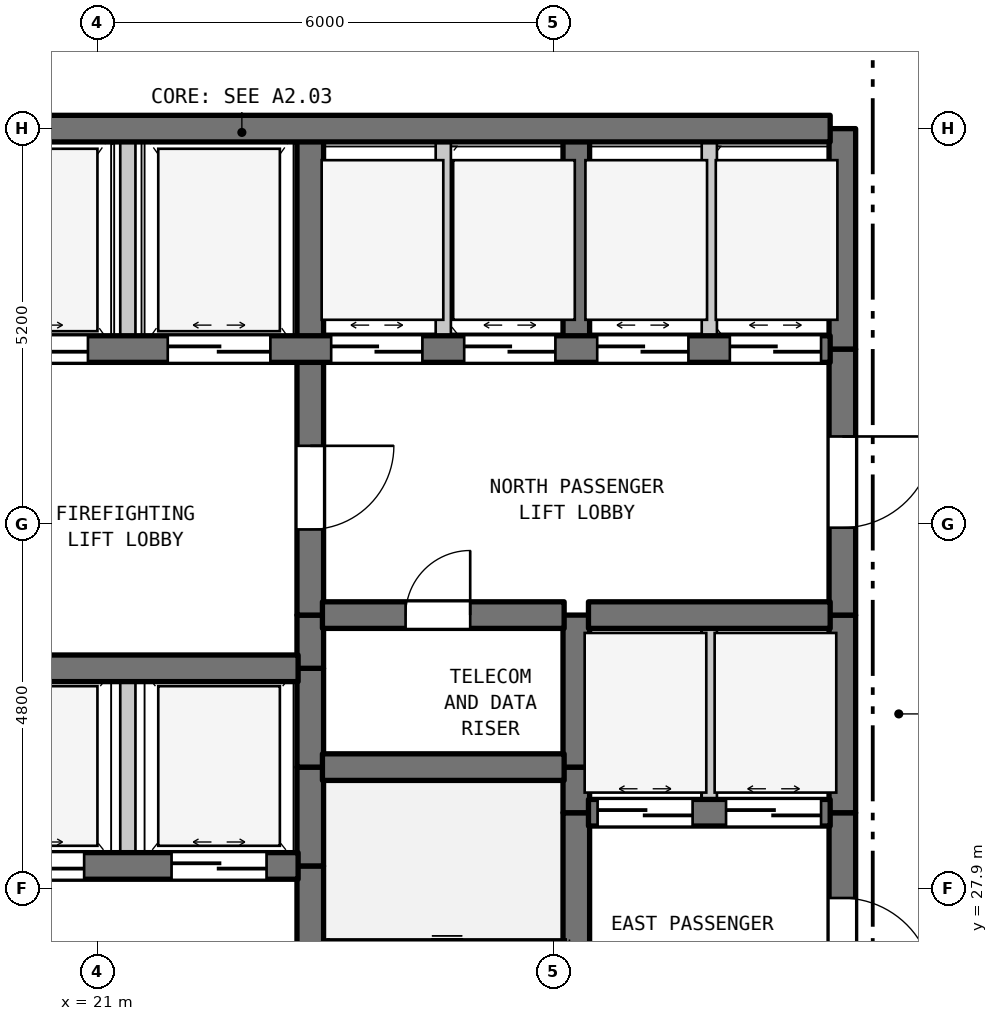
"""IFC4 building model, lengths in metres.
Left out: names, types, materials, properties, quantities, classifications, styles, units other than length and angle.
Written with IfcOpenShell. Run it as: python <this file> out.ifc"""

import sys

from ifc_helpers import new_model, si_unit, direction, frame, frame_2d, origin, place, context, subcontext, project, spatial, rectangle, extrude, element, fill, save


model = new_model("IFC4")
c1 = context("Model", 3, precision=1e-05, world=origin(), true_north=direction((0.0, 1.0)))
c2 = subcontext(c1, "Body", "Model", "MODEL_VIEW")
j1 = project(units=[si_unit("LENGTHUNIT", "METRE"), si_unit("PLANEANGLEUNIT", "RADIAN")], contexts=[c1])
p1 = place(None, origin())
s1 = spatial("IfcSite", under=j1, at=p1, CompositionType="ELEMENT")
p2 = place(p1, origin())
s2 = spatial("IfcBuilding", under=s1, at=p2, CompositionType="ELEMENT")
p3 = place(p2, origin())
s3 = spatial("IfcBuildingStorey", under=s2, at=p3, CompositionType="ELEMENT", Elevation=0.0)
p4 = place(p3, frame((21.4, 28.2, 0.0), z_axis=(0.0, 0.0, 1.0), x_axis=(0.0, 1.0, 0.0)))
e1 = element("IfcWall", 1, at=p4, inside=s3, PredefinedType="STANDARD", context=c2, shape_type="SweptSolid", body=[
    extrude(rectangle(XDim=2.6, YDim=0.2, at=frame_2d((1.3, 0.0))), origin(), (0.0, 0.0, 1.0), 6.17),
])
p5 = place(p3, frame((21.4, 35.0, 0.0), z_axis=(0.0, 0.0, 1.0), x_axis=(0.0, 1.0, 0.0)))
e2 = element("IfcWall", 2, at=p5, inside=s3, PredefinedType="STANDARD", context=c2, shape_type="SweptSolid", body=[
    extrude(rectangle(XDim=2.9, YDim=0.2, at=frame_2d((1.45, 0.0))), origin(), (0.0, 0.0, 1.0), 6.17),
])
p6 = place(p3, frame((23.8, 22.7, 0.0), z_axis=(0.0, 0.0, 1.0), x_axis=(0.0, 1.0, 0.0)))
e3 = element("IfcWall", 3, at=p6, inside=s3, PredefinedType="SHEAR", context=c2, shape_type="SweptSolid", body=[
    extrude(rectangle(XDim=5.5, YDim=0.35, at=frame_2d((2.75, 0.0))), origin(), (0.0, 0.0, 1.0), 6.17),
])
p7 = place(p6, frame((0.235, 0.0, 0.0)))
e4 = element("IfcOpeningElement", 4, at=p7, cuts=e3, PredefinedType="OPENING", context=c2, shape_type="SweptSolid", body=[
    extrude(rectangle(XDim=1.1, YDim=2.15, at=frame_2d((0.55, 1.075))), frame((0.0, 0.185, 0.0), z_axis=(0.0, -1.0, 0.0), x_axis=(1.0, 0.0, 0.0)), (0.0, 0.0, 1.0), 0.37),
])
for number, where, z_axis, x_axis in (
    (5, (23.8, 28.2, 0.0), (0.0, 0.0, 1.0), (0.0, 1.0, 0.0)),
    (6, (23.8, 29.5, 0.0), (0.0, 0.0, 1.0), (0.0, 1.0, 0.0)),
):
    element("IfcWall", number, at=place(p3, frame(where, z_axis=z_axis, x_axis=x_axis)), inside=s3, PredefinedType="SHEAR", context=c2, shape_type="SweptSolid", body=[
        extrude(rectangle(XDim=1.3, YDim=0.35, at=frame_2d((0.65, 0.0))), origin(), (0.0, 0.0, 1.0), 6.17),
    ])
p8 = place(p3, frame((23.8, 30.8, 0.0), z_axis=(0.0, 0.0, 1.0), x_axis=(0.0, 1.0, 0.0)))
e7 = element("IfcWall", 7, at=p8, inside=s3, PredefinedType="SHEAR", context=c2, shape_type="SweptSolid", body=[
    extrude(rectangle(XDim=0.7, YDim=0.35, at=frame_2d((0.35, 0.0))), origin(), (0.0, 0.0, 1.0), 6.17),
])
p9 = place(p3, frame((23.8, 31.5, 0.0), z_axis=(0.0, 0.0, 1.0), x_axis=(0.0, 1.0, 0.0)))
e8 = element("IfcWall", 8, at=p9, inside=s3, PredefinedType="SHEAR", context=c2, shape_type="SweptSolid", body=[
    extrude(rectangle(XDim=3.5, YDim=0.35, at=frame_2d((1.75, 0.0))), origin(), (0.0, 0.0, 1.0), 6.17),
])
p10 = place(p9, frame((1.127, 0.0, 0.0)))
e9 = element("IfcOpeningElement", 9, at=p10, cuts=e8, PredefinedType="OPENING", context=c2, shape_type="SweptSolid", body=[
    extrude(rectangle(XDim=1.1, YDim=2.15, at=frame_2d((0.55, 1.075))), frame((0.0, 0.185, 0.0), z_axis=(0.0, -1.0, 0.0), x_axis=(1.0, 0.0, 0.0)), (0.0, 0.0, 1.0), 0.37),
])
p11 = place(p3, frame((23.8, 35.0, 0.0), z_axis=(0.0, 0.0, 1.0), x_axis=(0.0, 1.0, 0.0)))
e10 = element("IfcWall", 10, at=p11, inside=s3, PredefinedType="SHEAR", context=c2, shape_type="SweptSolid", body=[
    extrude(rectangle(XDim=2.9, YDim=0.35, at=frame_2d((1.45, 0.0))), origin(), (0.0, 0.0, 1.0), 6.17),
])
p12 = place(p3, frame((25.55, 35.0, 0.0), z_axis=(0.0, 0.0, 1.0), x_axis=(0.0, 1.0, 0.0)))
e11 = element("IfcWall", 11, at=p12, inside=s3, PredefinedType="STANDARD", context=c2, shape_type="SweptSolid", body=[
    extrude(rectangle(XDim=2.9, YDim=0.2, at=frame_2d((1.45, 0.0))), origin(), (0.0, 0.0, 1.0), 6.17),
])
p13 = place(p3, frame((27.3, 25.6, 0.0), z_axis=(0.0, 0.0, 1.0), x_axis=(0.0, 1.0, 0.0)))
e12 = element("IfcWall", 12, at=p13, inside=s3, PredefinedType="SHEAR", context=c2, shape_type="SweptSolid", body=[
    extrude(rectangle(XDim=3.3, YDim=0.35, at=frame_2d((1.65, 0.0))), origin(), (0.0, 0.0, 1.0), 6.17),
])
p14 = place(p3, frame((27.3, 28.9, 0.0), z_axis=(0.0, 0.0, 1.0), x_axis=(0.0, 1.0, 0.0)))
e13 = element("IfcWall", 13, at=p14, inside=s3, PredefinedType="SHEAR", context=c2, shape_type="SweptSolid", body=[
    extrude(rectangle(XDim=0.6, YDim=0.35, at=frame_2d((0.3, 0.0))), origin(), (0.0, 0.0, 1.0), 6.17),
])
p15 = place(p3, frame((27.3, 29.5, 0.0), z_axis=(0.0, 0.0, 1.0), x_axis=(0.0, 1.0, 0.0)))
e14 = element("IfcWall", 14, at=p15, inside=s3, PredefinedType="SHEAR", context=c2, shape_type="SweptSolid", body=[
    extrude(rectangle(XDim=2.0, YDim=0.35, at=frame_2d((1.0, 0.0))), origin(), (0.0, 0.0, 1.0), 6.17),
])
p16 = place(p3, frame((27.3, 35.0, 0.0), z_axis=(0.0, 0.0, 1.0), x_axis=(0.0, 1.0, 0.0)))
e15 = element("IfcWall", 15, at=p16, inside=s3, PredefinedType="SHEAR", context=c2, shape_type="SweptSolid", body=[
    extrude(rectangle(XDim=2.9, YDim=0.35, at=frame_2d((1.45, 0.0))), origin(), (0.0, 0.0, 1.0), 6.17),
])
p17 = place(p3, frame((29.05, 28.9, 0.0), z_axis=(0.0, 0.0, 1.0), x_axis=(0.0, 1.0, 0.0)))
e16 = element("IfcWall", 16, at=p17, inside=s3, PredefinedType="STANDARD", context=c2, shape_type="SweptSolid", body=[
    extrude(rectangle(XDim=2.6, YDim=0.2, at=frame_2d((1.3, 0.0))), origin(), (0.0, 0.0, 1.0), 6.17),
])
p18 = place(p3, frame((29.05, 35.0, 0.0), z_axis=(0.0, 0.0, 1.0), x_axis=(0.0, 1.0, 0.0)))
e17 = element("IfcWall", 17, at=p18, inside=s3, PredefinedType="STANDARD", context=c2, shape_type="SweptSolid", body=[
    extrude(rectangle(XDim=2.9, YDim=0.2, at=frame_2d((1.45, 0.0))), origin(), (0.0, 0.0, 1.0), 6.17),
])
p19 = place(p3, frame((30.8, 25.6, 0.0), z_axis=(0.0, 0.0, 1.0), x_axis=(0.0, 1.0, 0.0)))
e18 = element("IfcWall", 18, at=p19, inside=s3, PredefinedType="SHEAR", context=c2, shape_type="SweptSolid", body=[
    extrude(rectangle(XDim=3.3, YDim=0.35, at=frame_2d((1.65, 0.0))), origin(), (0.0, 0.0, 1.0), 6.17),
])
p20 = place(p19, frame((0.978, 0.0, 0.0)))
e19 = element("IfcOpeningElement", 19, at=p20, cuts=e18, PredefinedType="OPENING", context=c2, shape_type="SweptSolid", body=[
    extrude(rectangle(XDim=1.2, YDim=2.2, at=frame_2d((0.6, 1.1))), frame((0.0, 0.185, 0.0), z_axis=(0.0, -1.0, 0.0), x_axis=(1.0, 0.0, 0.0)), (0.0, 0.0, 1.0), 0.37),
])
p21 = place(p3, frame((30.8, 28.9, 0.0), z_axis=(0.0, 0.0, 1.0), x_axis=(0.0, 1.0, 0.0)))
e20 = element("IfcWall", 20, at=p21, inside=s3, PredefinedType="SHEAR", context=c2, shape_type="SweptSolid", body=[
    extrude(rectangle(XDim=2.6, YDim=0.35, at=frame_2d((1.3, 0.0))), origin(), (0.0, 0.0, 1.0), 6.17),
])
p22 = place(p3, frame((30.8, 31.5, 0.0), z_axis=(0.0, 0.0, 1.0), x_axis=(0.0, 1.0, 0.0)))
e21 = element("IfcWall", 21, at=p22, inside=s3, PredefinedType="SHEAR", context=c2, shape_type="SweptSolid", body=[
    extrude(rectangle(XDim=3.5, YDim=0.35, at=frame_2d((1.75, 0.0))), origin(), (0.0, 0.0, 1.0), 6.17),
])
p23 = place(p22, frame((1.15, 0.0, 0.0)))
e22 = element("IfcOpeningElement", 22, at=p23, cuts=e21, PredefinedType="OPENING", context=c2, shape_type="SweptSolid", body=[
    extrude(rectangle(XDim=1.2, YDim=2.2, at=frame_2d((0.6, 1.1))), frame((0.0, 0.185, 0.0), z_axis=(0.0, -1.0, 0.0), x_axis=(1.0, 0.0, 0.0)), (0.0, 0.0, 1.0), 0.37),
])
p24 = place(p3, frame((30.8, 35.0, 0.0), z_axis=(0.0, 0.0, 1.0), x_axis=(0.0, 1.0, 0.0)))
e23 = element("IfcWall", 23, at=p24, inside=s3, PredefinedType="SHEAR", context=c2, shape_type="SweptSolid", body=[
    extrude(rectangle(XDim=2.9, YDim=0.35, at=frame_2d((1.45, 0.0))), origin(), (0.0, 0.0, 1.0), 6.17),
])
p25 = place(p3, frame((19.16, 28.2, 0.0), z_axis=(0.0, 0.0, 1.0), x_axis=(1.0, 0.0, 0.0)))
e24 = element("IfcWall", 24, at=p25, inside=s3, PredefinedType="SHEAR", context=c2, shape_type="SweptSolid", body=[
    extrude(rectangle(XDim=4.48, YDim=0.35, at=frame_2d((2.24, 0.0))), origin(), (0.0, 0.0, 1.0), 6.17),
])
p26 = place(p25, frame((0.415, 0.0, 0.0)))
e25 = element("IfcOpeningElement", 25, at=p26, cuts=e24, PredefinedType="OPENING", context=c2, shape_type="SweptSolid", body=[
    extrude(rectangle(XDim=1.25, YDim=2.2, at=frame_2d((0.625, 1.1))), frame((0.0, 0.185, 0.0), z_axis=(0.0, -1.0, 0.0), x_axis=(1.0, 0.0, 0.0)), (0.0, 0.0, 1.0), 0.37),
])
p27 = place(p25, frame((2.815, 0.0, 0.0)))
e26 = element("IfcOpeningElement", 26, at=p27, cuts=e24, PredefinedType="OPENING", context=c2, shape_type="SweptSolid", body=[
    extrude(rectangle(XDim=1.25, YDim=2.2, at=frame_2d((0.625, 1.1))), frame((0.0, 0.185, 0.0), z_axis=(0.0, -1.0, 0.0), x_axis=(1.0, 0.0, 0.0)), (0.0, 0.0, 1.0), 0.37),
])
p28 = place(p3, frame((27.46, 28.9, 0.0), z_axis=(0.0, 0.0, 1.0), x_axis=(1.0, 0.0, 0.0)))
e27 = element("IfcWall", 27, at=p28, inside=s3, PredefinedType="SHEAR", context=c2, shape_type="SweptSolid", body=[
    extrude(rectangle(XDim=3.18, YDim=0.35, at=frame_2d((1.59, 0.0))), origin(), (0.0, 0.0, 1.0), 6.17),
])
p29 = place(p28, frame((0.12, 0.0, 0.0)))
e28 = element("IfcOpeningElement", 28, at=p29, cuts=e27, PredefinedType="OPENING", context=c2, shape_type="SweptSolid", body=[
    extrude(rectangle(XDim=1.25, YDim=2.2, at=frame_2d((0.625, 1.1))), frame((0.0, 0.185, 0.0), z_axis=(0.0, -1.0, 0.0), x_axis=(1.0, 0.0, 0.0)), (0.0, 0.0, 1.0), 0.37),
])
p30 = place(p28, frame((1.81, 0.0, 0.0)))
e29 = element("IfcOpeningElement", 29, at=p30, cuts=e27, PredefinedType="OPENING", context=c2, shape_type="SweptSolid", body=[
    extrude(rectangle(XDim=1.25, YDim=2.2, at=frame_2d((0.625, 1.1))), frame((0.0, 0.185, 0.0), z_axis=(0.0, -1.0, 0.0), x_axis=(1.0, 0.0, 0.0)), (0.0, 0.0, 1.0), 0.37),
])
p31 = place(p3, frame((23.96, 29.5, 0.0), z_axis=(0.0, 0.0, 1.0), x_axis=(1.0, 0.0, 0.0)))
e30 = element("IfcWall", 30, at=p31, inside=s3, PredefinedType="SHEAR", context=c2, shape_type="SweptSolid", body=[
    extrude(rectangle(XDim=3.18, YDim=0.35, at=frame_2d((1.59, 0.0))), origin(), (0.0, 0.0, 1.0), 6.17),
])
p32 = place(p3, frame((19.16, 30.8, 0.0), z_axis=(0.0, 0.0, 1.0), x_axis=(1.0, 0.0, 0.0)))
e31 = element("IfcWall", 31, at=p32, inside=s3, PredefinedType="SHEAR", context=c2, shape_type="SweptSolid", body=[
    extrude(rectangle(XDim=4.48, YDim=0.35, at=frame_2d((2.24, 0.0))), origin(), (0.0, 0.0, 1.0), 6.17),
])
p33 = place(p3, frame((23.96, 31.5, 0.0), z_axis=(0.0, 0.0, 1.0), x_axis=(1.0, 0.0, 0.0)))
e32 = element("IfcWall", 32, at=p33, inside=s3, PredefinedType="SHEAR", context=c2, shape_type="SweptSolid", body=[
    extrude(rectangle(XDim=3.18, YDim=0.35, at=frame_2d((1.59, 0.0))), origin(), (0.0, 0.0, 1.0), 6.17),
])
p34 = place(p33, frame((1.094, 0.0, 0.0)))
e33 = element("IfcOpeningElement", 33, at=p34, cuts=e32, PredefinedType="OPENING", context=c2, shape_type="SweptSolid", body=[
    extrude(rectangle(XDim=0.85, YDim=2.1, at=frame_2d((0.425, 1.05))), frame((0.0, 0.185, 0.0), z_axis=(0.0, -1.0, 0.0), x_axis=(1.0, 0.0, 0.0)), (0.0, 0.0, 1.0), 0.37),
])
p35 = place(p3, frame((27.46, 31.5, 0.0), z_axis=(0.0, 0.0, 1.0), x_axis=(1.0, 0.0, 0.0)))
e34 = element("IfcWall", 34, at=p35, inside=s3, PredefinedType="SHEAR", context=c2, shape_type="SweptSolid", body=[
    extrude(rectangle(XDim=3.18, YDim=0.35, at=frame_2d((1.59, 0.0))), origin(), (0.0, 0.0, 1.0), 6.17),
])
p36 = place(p3, frame((19.16, 35.0, 0.0), z_axis=(0.0, 0.0, 1.0), x_axis=(1.0, 0.0, 0.0)))
e35 = element("IfcWall", 35, at=p36, inside=s3, PredefinedType="SHEAR", context=c2, shape_type="SweptSolid", body=[
    extrude(rectangle(XDim=11.48, YDim=0.35, at=frame_2d((5.74, 0.0))), origin(), (0.0, 0.0, 1.0), 6.17),
])
p37 = place(p36, frame((0.365, 0.0, 0.0)))
e36 = element("IfcOpeningElement", 36, at=p37, cuts=e35, PredefinedType="OPENING", context=c2, shape_type="SweptSolid", body=[
    extrude(rectangle(XDim=1.35, YDim=2.2, at=frame_2d((0.675, 1.1))), frame((0.0, 0.185, 0.0), z_axis=(0.0, -1.0, 0.0), x_axis=(1.0, 0.0, 0.0)), (0.0, 0.0, 1.0), 0.37),
])
p38 = place(p36, frame((2.765, 0.0, 0.0)))
e37 = element("IfcOpeningElement", 37, at=p38, cuts=e35, PredefinedType="OPENING", context=c2, shape_type="SweptSolid", body=[
    extrude(rectangle(XDim=1.35, YDim=2.2, at=frame_2d((0.675, 1.1))), frame((0.0, 0.185, 0.0), z_axis=(0.0, -1.0, 0.0), x_axis=(1.0, 0.0, 0.0)), (0.0, 0.0, 1.0), 0.37),
])
p39 = place(p36, frame((4.915, 0.0, 0.0)))
e38 = element("IfcOpeningElement", 38, at=p39, cuts=e35, PredefinedType="OPENING", context=c2, shape_type="SweptSolid", body=[
    extrude(rectangle(XDim=1.2, YDim=2.2, at=frame_2d((0.6, 1.1))), frame((0.0, 0.185, 0.0), z_axis=(0.0, -1.0, 0.0), x_axis=(1.0, 0.0, 0.0)), (0.0, 0.0, 1.0), 0.37),
])
p40 = place(p36, frame((6.665, 0.0, 0.0)))
e39 = element("IfcOpeningElement", 39, at=p40, cuts=e35, PredefinedType="OPENING", context=c2, shape_type="SweptSolid", body=[
    extrude(rectangle(XDim=1.2, YDim=2.2, at=frame_2d((0.6, 1.1))), frame((0.0, 0.185, 0.0), z_axis=(0.0, -1.0, 0.0), x_axis=(1.0, 0.0, 0.0)), (0.0, 0.0, 1.0), 0.37),
])
p41 = place(p36, frame((8.415, 0.0, 0.0)))
e40 = element("IfcOpeningElement", 40, at=p41, cuts=e35, PredefinedType="OPENING", context=c2, shape_type="SweptSolid", body=[
    extrude(rectangle(XDim=1.2, YDim=2.2, at=frame_2d((0.6, 1.1))), frame((0.0, 0.185, 0.0), z_axis=(0.0, -1.0, 0.0), x_axis=(1.0, 0.0, 0.0)), (0.0, 0.0, 1.0), 0.37),
])
p42 = place(p36, frame((10.16, 0.0, 0.0)))
e41 = element("IfcOpeningElement", 41, at=p42, cuts=e35, PredefinedType="OPENING", context=c2, shape_type="SweptSolid", body=[
    extrude(rectangle(XDim=1.2, YDim=2.2, at=frame_2d((0.6, 1.1))), frame((0.0, 0.185, 0.0), z_axis=(0.0, -1.0, 0.0), x_axis=(1.0, 0.0, 0.0)), (0.0, 0.0, 1.0), 0.37),
])
p43 = place(p3, frame((19.16, 37.9, 0.0), z_axis=(0.0, 0.0, 1.0), x_axis=(1.0, 0.0, 0.0)))
e42 = element("IfcWall", 42, at=p43, inside=s3, PredefinedType="SHEAR", context=c2, shape_type="SweptSolid", body=[
    extrude(rectangle(XDim=11.48, YDim=0.35, at=frame_2d((5.74, 0.0))), origin(), (0.0, 0.0, 1.0), 6.17),
])
p44 = place(p10, frame((1.1, 0.0, 0.0), z_axis=(0.0, 0.0, 1.0), x_axis=(-1.0, 0.0, 0.0)))
e43 = element("IfcDoor", 43, at=p44, inside=s3, OperationType="SINGLE_SWING_RIGHT", PredefinedType="DOOR", context=c2, shape_type="SweptSolid", body=[
    extrude(rectangle(XDim=1.1, YDim=2.15, at=frame_2d((0.55, 1.075))), frame((0.0, 0.025, 0.0), z_axis=(0.0, -1.0, 0.0), x_axis=(1.0, 0.0, 0.0)), (0.0, 0.0, 1.0), 0.05),
])
fill(e9, e43)
p45 = place(p20, frame((1.2, 0.0, 0.0), z_axis=(0.0, 0.0, 1.0), x_axis=(-1.0, 0.0, 0.0)))
e44 = element("IfcDoor", 44, at=p45, inside=s3, OperationType="SINGLE_SWING_LEFT", PredefinedType="DOOR", context=c2, shape_type="SweptSolid", body=[
    extrude(rectangle(XDim=1.2, YDim=2.2, at=frame_2d((0.6, 1.1))), frame((0.0, 0.025, 0.0), z_axis=(0.0, -1.0, 0.0), x_axis=(1.0, 0.0, 0.0)), (0.0, 0.0, 1.0), 0.05),
])
fill(e19, e44)
p46 = place(p23, frame((1.2, 0.0, 0.0), z_axis=(0.0, 0.0, 1.0), x_axis=(-1.0, 0.0, 0.0)))
e45 = element("IfcDoor", 45, at=p46, inside=s3, OperationType="SINGLE_SWING_RIGHT", PredefinedType="DOOR", context=c2, shape_type="SweptSolid", body=[
    extrude(rectangle(XDim=1.2, YDim=2.2, at=frame_2d((0.6, 1.1))), frame((0.0, 0.025, 0.0), z_axis=(0.0, -1.0, 0.0), x_axis=(1.0, 0.0, 0.0)), (0.0, 0.0, 1.0), 0.05),
])
fill(e22, e45)
p47 = place(p26, origin())
e46 = element("IfcDoor", 46, at=p47, inside=s3, OperationType="DOUBLE_DOOR_SLIDING", PredefinedType="DOOR", context=c2, shape_type="SweptSolid", body=[
    extrude(rectangle(XDim=1.25, YDim=2.2, at=frame_2d((0.625, 1.1))), frame((0.0, 0.025, 0.0), z_axis=(0.0, -1.0, 0.0), x_axis=(1.0, 0.0, 0.0)), (0.0, 0.0, 1.0), 0.05),
])
fill(e25, e46)
p48 = place(p27, origin())
e47 = element("IfcDoor", 47, at=p48, inside=s3, OperationType="DOUBLE_DOOR_SLIDING", PredefinedType="DOOR", context=c2, shape_type="SweptSolid", body=[
    extrude(rectangle(XDim=1.25, YDim=2.2, at=frame_2d((0.625, 1.1))), frame((0.0, 0.025, 0.0), z_axis=(0.0, -1.0, 0.0), x_axis=(1.0, 0.0, 0.0)), (0.0, 0.0, 1.0), 0.05),
])
fill(e26, e47)
p49 = place(p29, origin())
e48 = element("IfcDoor", 48, at=p49, inside=s3, OperationType="DOUBLE_DOOR_SLIDING", PredefinedType="DOOR", context=c2, shape_type="SweptSolid", body=[
    extrude(rectangle(XDim=1.25, YDim=2.2, at=frame_2d((0.625, 1.1))), frame((0.0, 0.025, 0.0), z_axis=(0.0, -1.0, 0.0), x_axis=(1.0, 0.0, 0.0)), (0.0, 0.0, 1.0), 0.05),
])
fill(e28, e48)
p50 = place(p30, origin())
e49 = element("IfcDoor", 49, at=p50, inside=s3, OperationType="DOUBLE_DOOR_SLIDING", PredefinedType="DOOR", context=c2, shape_type="SweptSolid", body=[
    extrude(rectangle(XDim=1.25, YDim=2.2, at=frame_2d((0.625, 1.1))), frame((0.0, 0.025, 0.0), z_axis=(0.0, -1.0, 0.0), x_axis=(1.0, 0.0, 0.0)), (0.0, 0.0, 1.0), 0.05),
])
fill(e29, e49)
p51 = place(p34, origin())
e50 = element("IfcDoor", 50, at=p51, inside=s3, OperationType="SINGLE_SWING_RIGHT", PredefinedType="DOOR", context=c2, shape_type="SweptSolid", body=[
    extrude(rectangle(XDim=0.85, YDim=2.1, at=frame_2d((0.425, 1.05))), frame((0.0, 0.025, 0.0), z_axis=(0.0, -1.0, 0.0), x_axis=(1.0, 0.0, 0.0)), (0.0, 0.0, 1.0), 0.05),
])
fill(e33, e50)
p52 = place(p37, origin())
e51 = element("IfcDoor", 51, at=p52, inside=s3, OperationType="DOUBLE_DOOR_SLIDING", PredefinedType="DOOR", context=c2, shape_type="SweptSolid", body=[
    extrude(rectangle(XDim=1.35, YDim=2.2, at=frame_2d((0.675, 1.1))), frame((0.0, 0.025, 0.0), z_axis=(0.0, -1.0, 0.0), x_axis=(1.0, 0.0, 0.0)), (0.0, 0.0, 1.0), 0.05),
])
fill(e36, e51)
p53 = place(p38, origin())
e52 = element("IfcDoor", 52, at=p53, inside=s3, OperationType="DOUBLE_DOOR_SLIDING", PredefinedType="DOOR", context=c2, shape_type="SweptSolid", body=[
    extrude(rectangle(XDim=1.35, YDim=2.2, at=frame_2d((0.675, 1.1))), frame((0.0, 0.025, 0.0), z_axis=(0.0, -1.0, 0.0), x_axis=(1.0, 0.0, 0.0)), (0.0, 0.0, 1.0), 0.05),
])
fill(e37, e52)
p54 = place(p39, origin())
e53 = element("IfcDoor", 53, at=p54, inside=s3, OperationType="DOUBLE_DOOR_SLIDING", PredefinedType="DOOR", context=c2, shape_type="SweptSolid", body=[
    extrude(rectangle(XDim=1.2, YDim=2.2, at=frame_2d((0.6, 1.1))), frame((0.0, 0.025, 0.0), z_axis=(0.0, -1.0, 0.0), x_axis=(1.0, 0.0, 0.0)), (0.0, 0.0, 1.0), 0.05),
])
fill(e38, e53)
p55 = place(p40, origin())
e54 = element("IfcDoor", 54, at=p55, inside=s3, OperationType="DOUBLE_DOOR_SLIDING", PredefinedType="DOOR", context=c2, shape_type="SweptSolid", body=[
    extrude(rectangle(XDim=1.2, YDim=2.2, at=frame_2d((0.6, 1.1))), frame((0.0, 0.025, 0.0), z_axis=(0.0, -1.0, 0.0), x_axis=(1.0, 0.0, 0.0)), (0.0, 0.0, 1.0), 0.05),
])
fill(e39, e54)
p56 = place(p41, origin())
e55 = element("IfcDoor", 55, at=p56, inside=s3, OperationType="DOUBLE_DOOR_SLIDING", PredefinedType="DOOR", context=c2, shape_type="SweptSolid", body=[
    extrude(rectangle(XDim=1.2, YDim=2.2, at=frame_2d((0.6, 1.1))), frame((0.0, 0.025, 0.0), z_axis=(0.0, -1.0, 0.0), x_axis=(1.0, 0.0, 0.0)), (0.0, 0.0, 1.0), 0.05),
])
fill(e40, e55)
p57 = place(p42, origin())
e56 = element("IfcDoor", 56, at=p57, inside=s3, OperationType="DOUBLE_DOOR_SLIDING", PredefinedType="DOOR", context=c2, shape_type="SweptSolid", body=[
    extrude(rectangle(XDim=1.2, YDim=2.2, at=frame_2d((0.6, 1.1))), frame((0.0, 0.025, 0.0), z_axis=(0.0, -1.0, 0.0), x_axis=(1.0, 0.0, 0.0)), (0.0, 0.0, 1.0), 0.05),
])
fill(e41, e56)
save(model, sys.argv[1])
